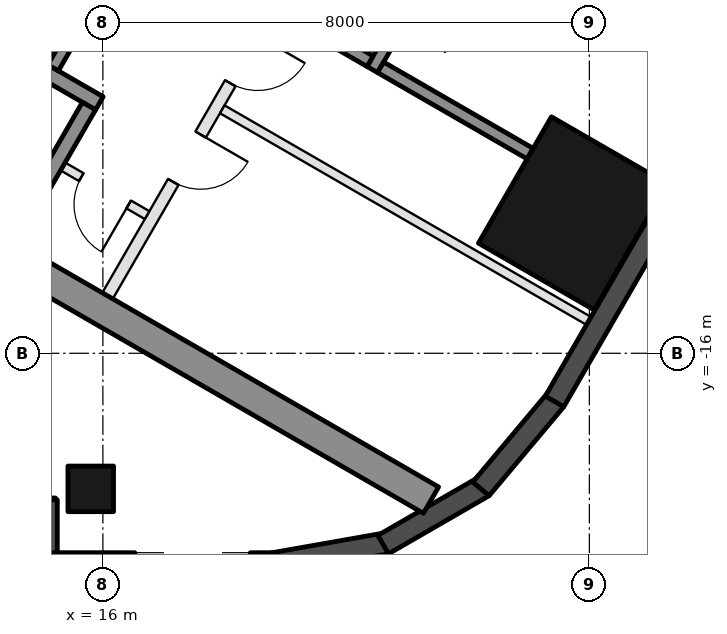
"""IFC4 building model, lengths in metres.
Left out: names, types, materials, properties, quantities, classifications, styles, units other than length and angle.
Written with IfcOpenShell. Run it as: python <this file> out.ifc"""

import sys

from ifc_helpers import new_model, si_unit, direction, frame, frame_2d, origin, origin_2d, place, context, subcontext, project, spatial, rectangle, hollow_rectangle, extrude, element, fill, save


model = new_model("IFC4")
c1 = context("Model", 3, precision=1e-05, world=origin(), true_north=direction((0.0, 1.0)))
c2 = subcontext(c1, "Body", "Model", "MODEL_VIEW")
j1 = project(units=[si_unit("LENGTHUNIT", "METRE"), si_unit("PLANEANGLEUNIT", "RADIAN")], contexts=[c1])
p1 = place(None, origin())
s1 = spatial("IfcSite", under=j1, at=p1, CompositionType="ELEMENT")
p2 = place(p1, origin())
s2 = spatial("IfcBuilding", under=s1, at=p2, CompositionType="ELEMENT")
p3 = place(p2, frame((0.0, 0.0, 202.1)))
s3 = spatial("IfcBuildingStorey", under=s2, at=p3, CompositionType="ELEMENT", Elevation=202.1)
p4 = place(p3, frame((15.8, -18.23, 0.0), z_axis=(0.0, 0.0, 1.0), x_axis=(-1.0, 0.0, 0.0)))
e1 = element("IfcColumn", 1, at=p4, inside=s3, PredefinedType="COLUMN", context=c2, shape_type="SweptSolid", body=[
    extrude(hollow_rectangle(XDim=0.75, YDim=0.75, WallThickness=0.035, at=origin_2d()), origin(), (0.0, 0.0, 1.0), 3.7),
])
p5 = place(p3, frame((23.729, -13.7, 0.0), z_axis=(0.0, 0.0, 1.0), x_axis=(0.5, 0.866025403784, 0.0)))
e2 = element("IfcColumn", 2, at=p5, inside=s3, PredefinedType="COLUMN", context=c2, shape_type="SweptSolid", body=[
    extrude(hollow_rectangle(XDim=2.4, YDim=2.2, WallThickness=0.06, at=origin_2d()), origin(), (0.0, 0.0, 1.0), 3.7),
])
p6 = place(p3, frame((8.48, -18.555, 0.0), z_axis=(0.0, 0.0, 1.0), x_axis=(1.0, 0.0, 0.0)))
e3 = element("IfcWall", 3, at=p6, inside=s3, PredefinedType="SOLIDWALL", context=c2, shape_type="SweptSolid", body=[
    extrude(rectangle(XDim=6.74, YDim=0.35, at=frame_2d((3.37, 0.0))), origin(), (0.0, 0.0, 1.0), 3.55),
])
p7 = place(p6, frame((3.57, 0.0, 0.0)))
e4 = element("IfcOpeningElement", 4, at=p7, cuts=e3, PredefinedType="OPENING", context=c2, shape_type="SweptSolid", body=[
    extrude(rectangle(XDim=2.4, YDim=2.4, at=frame_2d((1.2, 1.2))), frame((0.0, 0.185, 0.0), z_axis=(0.0, -1.0, 0.0), x_axis=(1.0, 0.0, 0.0)), (0.0, 0.0, 1.0), 0.37),
])
p8 = place(p6, frame((0.32, 0.0, 0.3)))
e5 = element("IfcOpeningElement", 5, at=p8, cuts=e3, PredefinedType="OPENING", context=c2, shape_type="SweptSolid", body=[
    extrude(rectangle(XDim=2.9, YDim=2.65, at=frame_2d((1.45, 1.325))), frame((0.0, 0.185, 0.0), z_axis=(0.0, -1.0, 0.0), x_axis=(1.0, 0.0, 0.0)), (0.0, 0.0, 1.0), 0.37),
])
p9 = place(p3, frame((15.075, -18.41, 0.0), z_axis=(0.0, 0.0, 1.0), x_axis=(0.0, -1.0, 0.0)))
e6 = element("IfcWall", 6, at=p9, inside=s3, PredefinedType="SOLIDWALL", context=c2, shape_type="SweptSolid", body=[
    extrude(rectangle(XDim=1.22, YDim=0.35, at=frame_2d((0.61, 0.0))), origin(), (0.0, 0.0, 1.0), 3.55),
])
p10 = place(p3, frame((14.9, -19.455, 0.0), z_axis=(0.0, 0.0, 1.0), x_axis=(1.0, 0.0, 0.0)))
e7 = element("IfcWall", 7, at=p10, inside=s3, PredefinedType="SOLIDWALL", context=c2, shape_type="SweptSolid", body=[
    extrude(rectangle(XDim=3.916, YDim=0.35, at=frame_2d((1.958, 0.0))), origin(), (0.0, 0.0, 1.0), 3.55),
])
p11 = place(p10, frame((1.625, 0.0, 0.3)))
e8 = element("IfcOpeningElement", 8, at=p11, cuts=e7, PredefinedType="OPENING", context=c2, shape_type="SweptSolid", body=[
    extrude(rectangle(XDim=1.9, YDim=2.65, at=frame_2d((0.95, 1.325))), frame((0.0, 0.185, 0.0), z_axis=(0.0, -1.0, 0.0), x_axis=(1.0, 0.0, 0.0)), (0.0, 0.0, 1.0), 0.37),
])
p12 = place(p3, frame((18.785, -19.458, 0.0), z_axis=(0.0, 0.0, 1.0), x_axis=(0.984798995425, 0.173697837091, 0.0)))
e9 = element("IfcWall", 9, at=p12, inside=s3, PredefinedType="SOLIDWALL", context=c2, shape_type="SweptSolid", body=[
    extrude(rectangle(XDim=1.91, YDim=0.35, at=frame_2d((0.955, 0.0))), origin(), (0.0, 0.0, 1.0), 3.55),
])
for number, where, z_axis, x_axis in (
    (10, (20.61, -19.147, 0.0), (0.0, 0.0, 1.0), (0.866, 0.5, 0.0)),
    (11, (22.217, -18.231, 0.0), (0.0, 0.0, 1.0), (0.643, 0.766, 0.0)),
):
    element("IfcWall", number, at=place(p3, frame(where, z_axis=z_axis, x_axis=x_axis)), inside=s3, PredefinedType="SOLIDWALL", context=c2, shape_type="SweptSolid", body=[
        extrude(rectangle(XDim=1.91, YDim=0.35, at=frame_2d((0.955, 0.0))), origin(), (0.0, 0.0, 1.0), 3.55),
    ])
p13 = place(p3, frame((23.427, -16.792, 0.0), z_axis=(0.0, 0.0, 1.0), x_axis=(0.500018773155, 0.866014564827, 0.0)))
e12 = element("IfcWall", 12, at=p13, inside=s3, PredefinedType="SOLIDWALL", context=c2, shape_type="SweptSolid", body=[
    extrude(rectangle(XDim=5.658, YDim=0.35, at=frame_2d((2.829, 0.0))), origin(), (0.0, 0.0, 1.0), 3.55),
])
p14 = place(p3, frame((8.547, -10.997, 0.0), z_axis=(0.0, 0.0, 1.0), x_axis=(0.866025009528, -0.500000682871, 0.0)))
e13 = element("IfcWall", 13, at=p14, inside=s3, PredefinedType="SHEAR", context=c2, shape_type="SweptSolid", body=[
    extrude(rectangle(XDim=14.837, YDim=0.5, at=frame_2d((7.418, 0.0))), origin(), (0.0, 0.0, 1.0), 3.5),
])
p15 = place(p3, frame((10.356, -8.664, 0.0), z_axis=(0.0, 0.0, 1.0), x_axis=(0.866028629588, -0.499994412703, 0.0)))
e14 = element("IfcWall", 14, at=p15, inside=s3, PredefinedType="SHEAR", context=c2, shape_type="SweptSolid", body=[
    extrude(rectangle(XDim=6.45, YDim=0.25, at=frame_2d((3.225, 0.0))), origin(), (0.0, 0.0, 1.0), 3.5),
])
p16 = place(p15, frame((0.3, 0.0, 0.0)))
e15 = element("IfcOpeningElement", 15, at=p16, cuts=e14, PredefinedType="OPENING", context=c2, shape_type="SweptSolid", body=[
    extrude(rectangle(XDim=1.0, YDim=2.1, at=frame_2d((0.5, 1.05))), frame((0.0, 0.135, 0.0), z_axis=(0.0, -1.0, 0.0), x_axis=(1.0, 0.0, 0.0)), (0.0, 0.0, 1.0), 0.27),
])
p17 = place(p3, frame((14.496, -14.143, 0.0), z_axis=(0.0, 0.0, 1.0), x_axis=(0.500062241894, 0.865989465428, 0.0)))
e16 = element("IfcWall", 16, at=p17, inside=s3, PredefinedType="SHEAR", context=c2, shape_type="SweptSolid", body=[
    extrude(rectangle(XDim=2.55, YDim=0.25, at=frame_2d((1.275, 0.0))), origin(), (0.0, 0.0, 1.0), 3.5),
])
p18 = place(p3, frame((15.181, -11.305, 0.0), z_axis=(0.0, 0.0, 1.0), x_axis=(0.49994636267, 0.866056369097, 0.0)))
e17 = element("IfcWall", 17, at=p18, inside=s3, PredefinedType="SHEAR", context=c2, shape_type="SweptSolid", body=[
    extrude(rectangle(XDim=2.8, YDim=0.2, at=frame_2d((1.4, 0.0))), origin(), (0.0, 0.0, 1.0), 3.5),
])
p19 = place(p3, frame((20.43, -11.333, 0.0), z_axis=(0.0, 0.0, 1.0), x_axis=(0.500001309137, 0.866024647952, 0.0)))
e18 = element("IfcWall", 18, at=p19, inside=s3, PredefinedType="SHEAR", context=c2, shape_type="SweptSolid", body=[
    extrude(rectangle(XDim=2.4, YDim=0.2, at=frame_2d((1.2, 0.0))), origin(), (0.0, 0.0, 1.0), 3.5),
])
p20 = place(p19, frame((0.85, 0.0, 0.0)))
e19 = element("IfcOpeningElement", 19, at=p20, cuts=e18, PredefinedType="OPENING", context=c2, shape_type="SweptSolid", body=[
    extrude(rectangle(XDim=0.9, YDim=2.1, at=frame_2d((0.45, 1.05))), frame((0.0, 0.11, 0.0), z_axis=(0.0, -1.0, 0.0), x_axis=(1.0, 0.0, 0.0)), (0.0, 0.0, 1.0), 0.22),
])
p21 = place(p3, frame((18.913, -10.342, 0.0), z_axis=(0.0, 0.0, 1.0), x_axis=(0.866038183914, -0.499977863513, 0.0)))
e20 = element("IfcWall", 20, at=p21, inside=s3, PredefinedType="SHEAR", context=c2, shape_type="SweptSolid", body=[
    extrude(rectangle(XDim=1.71, YDim=0.2, at=frame_2d((0.855, 0.0))), origin(), (0.0, 0.0, 1.0), 3.5),
])
p22 = place(p3, frame((20.567, -11.297, 0.0), z_axis=(0.0, 0.0, 1.0), x_axis=(0.866055327414, -0.49994816717, 0.0)))
e21 = element("IfcWall", 21, at=p22, inside=s3, PredefinedType="SHEAR", context=c2, shape_type="SweptSolid", body=[
    extrude(rectangle(XDim=2.84, YDim=0.2, at=frame_2d((1.42, 0.0))), origin(), (0.0, 0.0, 1.0), 3.5),
])
p23 = place(p3, frame((16.076, -15.055, 0.0), z_axis=(0.0, 0.0, 1.0), x_axis=(0.499995103361, 0.866028230842, 0.0)))
e22 = element("IfcWall", 22, at=p23, inside=s3, PredefinedType="PARTITIONING", context=c2, shape_type="SweptSolid", body=[
    extrude(rectangle(XDim=5.4, YDim=0.2, at=frame_2d((2.7, 0.0))), origin(), (0.0, 0.0, 1.0), 3.5),
])
p24 = place(p23, frame((2.163, 0.0, 0.0)))
e23 = element("IfcOpeningElement", 23, at=p24, cuts=e22, PredefinedType="OPENING", context=c2, shape_type="SweptSolid", body=[
    extrude(rectangle(XDim=0.9, YDim=2.1, at=frame_2d((0.45, 1.05))), frame((0.0, 0.11, 0.0), z_axis=(0.0, -1.0, 0.0), x_axis=(1.0, 0.0, 0.0)), (0.0, 0.0, 1.0), 0.22),
])
p25 = place(p23, frame((4.038, 0.0, 0.0)))
e24 = element("IfcOpeningElement", 24, at=p25, cuts=e22, PredefinedType="OPENING", context=c2, shape_type="SweptSolid", body=[
    extrude(rectangle(XDim=0.9, YDim=2.1, at=frame_2d((0.45, 1.05))), frame((0.0, 0.11, 0.0), z_axis=(0.0, -1.0, 0.0), x_axis=(1.0, 0.0, 0.0)), (0.0, 0.0, 1.0), 0.22),
])
p26 = place(p3, frame((15.342, -12.928, 0.0), z_axis=(0.0, 0.0, 1.0), x_axis=(0.865989903783, -0.500061482766, 0.0)))
e25 = element("IfcWall", 25, at=p26, inside=s3, PredefinedType="PARTITIONING", context=c2, shape_type="SweptSolid", body=[
    extrude(rectangle(XDim=1.6, YDim=0.15, at=frame_2d((0.8, 0.0))), origin(), (0.0, 0.0, 1.0), 3.5),
])
p27 = place(p26, frame((0.35, 0.0, 0.0)))
e26 = element("IfcOpeningElement", 26, at=p27, cuts=e25, PredefinedType="OPENING", context=c2, shape_type="SweptSolid", body=[
    extrude(rectangle(XDim=0.9, YDim=2.1, at=frame_2d((0.45, 1.05))), frame((0.0, 0.085, 0.0), z_axis=(0.0, -1.0, 0.0), x_axis=(1.0, 0.0, 0.0)), (0.0, 0.0, 1.0), 0.17),
])
p28 = place(p3, frame((17.963, -11.987, 0.0), z_axis=(0.0, 0.0, 1.0), x_axis=(0.866016523273, -0.500015381182, 0.0)))
e27 = element("IfcWall", 27, at=p28, inside=s3, PredefinedType="PARTITIONING", context=c2, shape_type="SweptSolid", body=[
    extrude(rectangle(XDim=6.95, YDim=0.15, at=frame_2d((3.475, 0.0))), origin(), (0.0, 0.0, 1.0), 3.5),
])
p29 = place(p27, frame((0.9, 0.0, 0.0), z_axis=(0.0, 0.0, 1.0), x_axis=(-1.0, 0.0, 0.0)))
e28 = element("IfcDoor", 28, at=p29, inside=s3, OperationType="SINGLE_SWING_LEFT", PredefinedType="DOOR", context=c2, shape_type="SweptSolid", body=[
    extrude(rectangle(XDim=0.9, YDim=2.1, at=frame_2d((0.45, 1.05))), frame((0.0, 0.025, 0.0), z_axis=(0.0, -1.0, 0.0), x_axis=(1.0, 0.0, 0.0)), (0.0, 0.0, 1.0), 0.05),
])
fill(e26, e28)
p30 = place(p24, frame((0.9, 0.0, 0.0), z_axis=(0.0, 0.0, 1.0), x_axis=(-1.0, 0.0, 0.0)))
e29 = element("IfcDoor", 29, at=p30, inside=s3, OperationType="SINGLE_SWING_LEFT", PredefinedType="DOOR", context=c2, shape_type="SweptSolid", body=[
    extrude(rectangle(XDim=0.9, YDim=2.1, at=frame_2d((0.45, 1.05))), frame((0.0, 0.025, 0.0), z_axis=(0.0, -1.0, 0.0), x_axis=(1.0, 0.0, 0.0)), (0.0, 0.0, 1.0), 0.05),
])
fill(e23, e29)
p31 = place(p25, frame((0.9, 0.0, 0.0), z_axis=(0.0, 0.0, 1.0), x_axis=(-1.0, 0.0, 0.0)))
e30 = element("IfcDoor", 30, at=p31, inside=s3, OperationType="SINGLE_SWING_LEFT", PredefinedType="DOOR", context=c2, shape_type="SweptSolid", body=[
    extrude(rectangle(XDim=0.9, YDim=2.1, at=frame_2d((0.45, 1.05))), frame((0.0, 0.025, 0.0), z_axis=(0.0, -1.0, 0.0), x_axis=(1.0, 0.0, 0.0)), (0.0, 0.0, 1.0), 0.05),
])
fill(e24, e30)
save(model, sys.argv[1])
